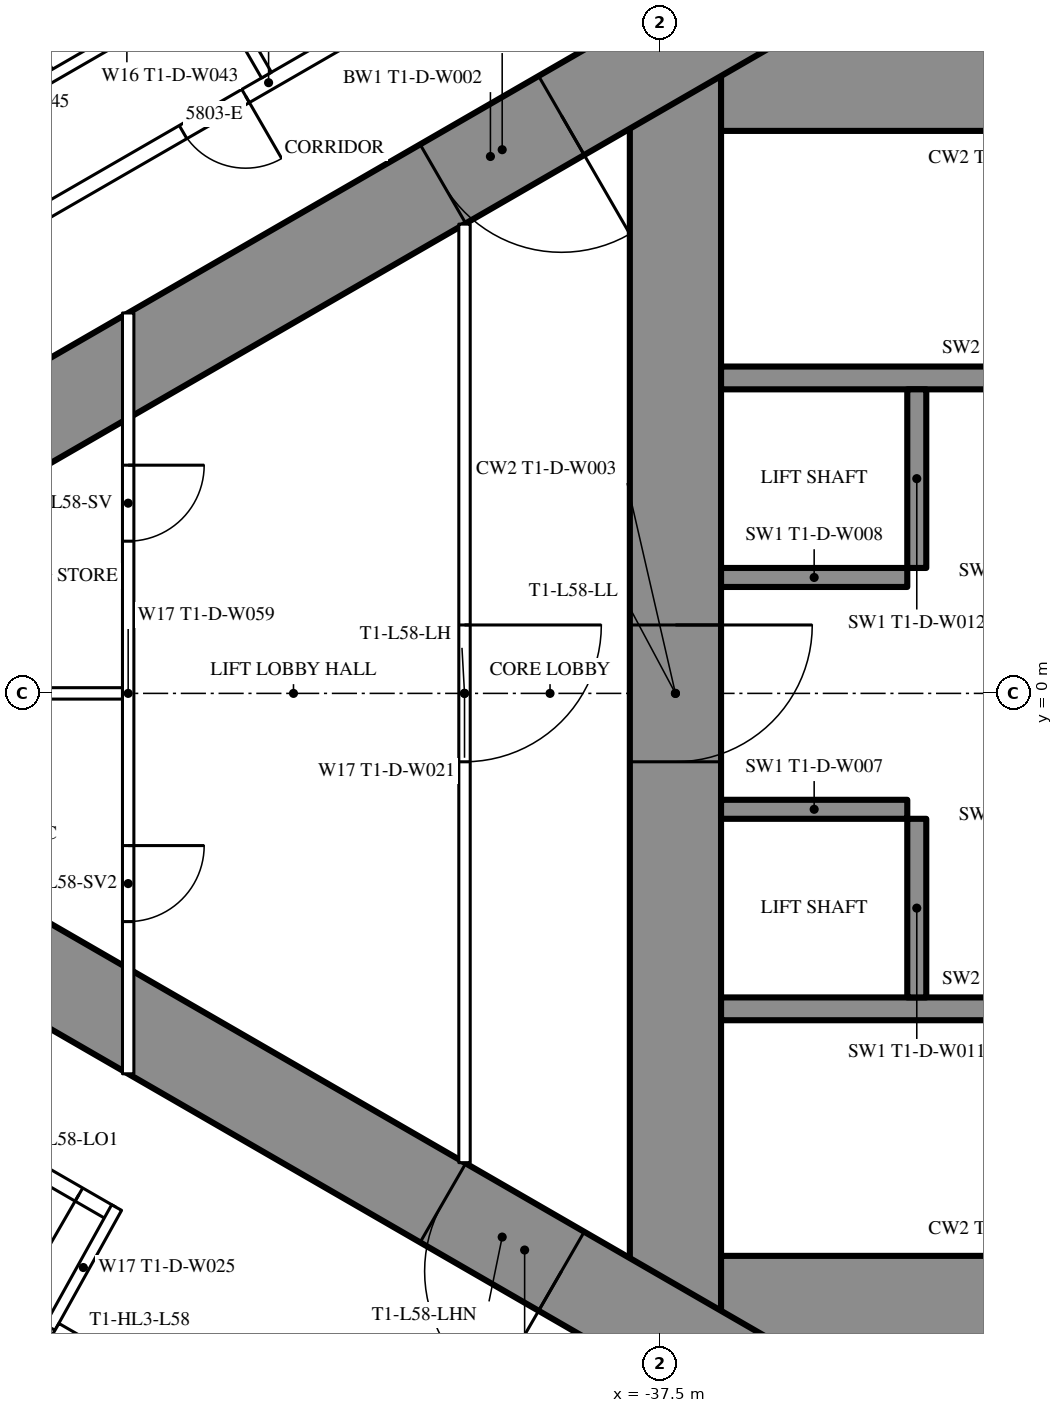
"""IFC4 building model, lengths in metres.
Left out: names, types, materials, properties, quantities, classifications, styles, units other than length and angle.
Written with IfcOpenShell. Run it as: python <this file> out.ifc"""

import sys

from ifc_helpers import new_model, si_unit, direction, frame, frame_2d, origin, place, context, subcontext, project, spatial, rectangle, extrude, element, fill, save


model = new_model("IFC4")
c1 = context("Model", 3, precision=1e-05, world=origin(), true_north=direction((0.0, 1.0)))
c2 = subcontext(c1, "Body", "Model", "MODEL_VIEW")
j1 = project(units=[si_unit("LENGTHUNIT", "METRE"), si_unit("PLANEANGLEUNIT", "RADIAN")], contexts=[c1])
p1 = place(None, origin())
s1 = spatial("IfcSite", under=j1, at=p1, CompositionType="ELEMENT")
p2 = place(p1, origin())
s2 = spatial("IfcBuilding", under=s1, at=p2, CompositionType="ELEMENT")
p3 = place(p2, frame((0.0, 0.0, 218.9)))
s3 = spatial("IfcBuildingStorey", under=s2, at=p3, CompositionType="ELEMENT", Elevation=218.9)
p4 = place(p3, frame((-37.3, 8.6, 0.0), z_axis=(0.0, 0.0, 1.0), x_axis=(0.0, -1.0, 0.0)))
e1 = element("IfcWall", 1, at=p4, inside=s3, PredefinedType="SHEAR", context=c2, shape_type="SweptSolid", body=[
    extrude(rectangle(XDim=17.2, YDim=1.2, at=frame_2d((8.6, 0.0))), origin(), (0.0, 0.0, 1.0), 3.6),
])
p5 = place(p4, frame((7.7, 0.0, 0.0)))
e2 = element("IfcOpeningElement", 2, at=p5, cuts=e1, PredefinedType="OPENING", context=c2, shape_type="SweptSolid", body=[
    extrude(rectangle(XDim=1.8, YDim=2.2, at=frame_2d((0.9, 1.1))), frame((0.0, 0.61, 0.0), z_axis=(0.0, -1.0, 0.0), x_axis=(1.0, 0.0, 0.0)), (0.0, 0.0, 1.0), 1.22),
])
p6 = place(p3, frame((-28.3, 8.0, 0.0), z_axis=(0.0, 0.0, 1.0), x_axis=(-1.0, 0.0, 0.0)))
e3 = element("IfcWall", 3, at=p6, inside=s3, PredefinedType="SHEAR", context=c2, shape_type="SweptSolid", body=[
    extrude(rectangle(XDim=8.4, YDim=1.2, at=frame_2d((4.2, 0.0))), origin(), (0.0, 0.0, 1.0), 3.6),
])
p7 = place(p6, frame((0.25, 0.0, 0.0)))
e4 = element("IfcOpeningElement", 4, at=p7, cuts=e3, PredefinedType="OPENING", context=c2, shape_type="SweptSolid", body=[
    extrude(rectangle(XDim=1.0, YDim=2.2, at=frame_2d((0.5, 1.1))), frame((0.0, 0.61, 0.0), z_axis=(0.0, -1.0, 0.0), x_axis=(1.0, 0.0, 0.0)), (0.0, 0.0, 1.0), 1.22),
])
p8 = place(p3, frame((-28.3, -8.0, 0.0), z_axis=(0.0, 0.0, 1.0), x_axis=(-1.0, 0.0, 0.0)))
e5 = element("IfcWall", 5, at=p8, inside=s3, PredefinedType="SHEAR", context=c2, shape_type="SweptSolid", body=[
    extrude(rectangle(XDim=8.4, YDim=1.2, at=frame_2d((4.2, 0.0))), origin(), (0.0, 0.0, 1.0), 3.6),
])
p9 = place(p8, frame((0.25, 0.0, 0.0)))
e6 = element("IfcOpeningElement", 6, at=p9, cuts=e5, PredefinedType="OPENING", context=c2, shape_type="SweptSolid", body=[
    extrude(rectangle(XDim=1.0, YDim=2.2, at=frame_2d((0.5, 1.1))), frame((0.0, 0.61, 0.0), z_axis=(0.0, -1.0, 0.0), x_axis=(1.0, 0.0, 0.0)), (0.0, 0.0, 1.0), 1.22),
])
for number, where, z_axis, x_axis in (
    (7, (-28.3, 4.15, 0.0), (0.0, 0.0, 1.0), (-1.0, 0.0, 0.0)),
    (8, (-28.3, -4.15, 0.0), (0.0, 0.0, 1.0), (-1.0, 0.0, 0.0)),
):
    element("IfcWall", number, at=place(p3, frame(where, z_axis=z_axis, x_axis=x_axis)), inside=s3, PredefinedType="SHEAR", context=c2, shape_type="SweptSolid", body=[
        extrude(rectangle(XDim=8.4, YDim=0.3, at=frame_2d((4.2, 0.0))), origin(), (0.0, 0.0, 1.0), 3.6),
    ])
p10 = place(p3, frame((-34.125, 4.0, 0.0), z_axis=(0.0, 0.0, 1.0), x_axis=(0.0, -1.0, 0.0)))
e9 = element("IfcWall", 9, at=p10, inside=s3, PredefinedType="SHEAR", context=c2, shape_type="SweptSolid", body=[
    extrude(rectangle(XDim=2.35, YDim=0.25, at=frame_2d((1.175, 0.0))), origin(), (0.0, 0.0, 1.0), 3.6),
])
p11 = place(p3, frame((-34.25, 1.525, 0.0), z_axis=(0.0, 0.0, 1.0), x_axis=(-1.0, 0.0, 0.0)))
e10 = element("IfcWall", 10, at=p11, inside=s3, PredefinedType="SHEAR", context=c2, shape_type="SweptSolid", body=[
    extrude(rectangle(XDim=2.45, YDim=0.25, at=frame_2d((1.225, 0.0))), origin(), (0.0, 0.0, 1.0), 3.6),
])
p12 = place(p3, frame((-34.125, -1.65, 0.0), z_axis=(0.0, 0.0, 1.0), x_axis=(0.0, -1.0, 0.0)))
e11 = element("IfcWall", 11, at=p12, inside=s3, PredefinedType="SHEAR", context=c2, shape_type="SweptSolid", body=[
    extrude(rectangle(XDim=2.35, YDim=0.25, at=frame_2d((1.175, 0.0))), origin(), (0.0, 0.0, 1.0), 3.6),
])
p13 = place(p3, frame((-34.25, -1.525, 0.0), z_axis=(0.0, 0.0, 1.0), x_axis=(-1.0, 0.0, 0.0)))
e12 = element("IfcWall", 12, at=p13, inside=s3, PredefinedType="SHEAR", context=c2, shape_type="SweptSolid", body=[
    extrude(rectangle(XDim=2.45, YDim=0.25, at=frame_2d((1.225, 0.0))), origin(), (0.0, 0.0, 1.0), 3.6),
])
p14 = place(p3, frame((-27.2, 14.3, 0.0), z_axis=(0.0, 0.0, 1.0), x_axis=(-0.866026593062, -0.499997940104, 0.0)))
e13 = element("IfcWall", 13, at=p14, inside=s3, PredefinedType="SHEAR", context=c2, shape_type="SweptSolid", body=[
    extrude(rectangle(XDim=28.946, YDim=1.2, at=frame_2d((14.473, 0.0))), origin(), (0.0, 0.0, 1.0), 3.6),
])
p15 = place(p14, frame((4.6, 0.0, 0.0)))
e14 = element("IfcOpeningElement", 14, at=p15, cuts=e13, PredefinedType="OPENING", context=c2, shape_type="SweptSolid", body=[
    extrude(rectangle(XDim=1.0, YDim=2.2, at=frame_2d((0.5, 1.1))), frame((0.0, 0.61, 0.0), z_axis=(0.0, -1.0, 0.0), x_axis=(1.0, 0.0, 0.0)), (0.0, 0.0, 1.0), 1.22),
])
p16 = place(p14, frame((13.395, 0.0, 0.0)))
e15 = element("IfcOpeningElement", 15, at=p16, cuts=e13, PredefinedType="OPENING", context=c2, shape_type="SweptSolid", body=[
    extrude(rectangle(XDim=1.8, YDim=2.2, at=frame_2d((0.9, 1.1))), frame((0.0, 0.61, 0.0), z_axis=(0.0, -1.0, 0.0), x_axis=(1.0, 0.0, 0.0)), (0.0, 0.0, 1.0), 1.22),
])
p17 = place(p3, frame((-27.2, -14.3, 0.0), z_axis=(0.0, 0.0, 1.0), x_axis=(-0.866024021859, 0.500002393557, 0.0)))
e16 = element("IfcWall", 16, at=p17, inside=s3, PredefinedType="SHEAR", context=c2, shape_type="SweptSolid", body=[
    extrude(rectangle(XDim=27.907, YDim=1.2, at=frame_2d((13.954, 0.0))), origin(), (0.0, 0.0, 1.0), 3.6),
])
p18 = place(p17, frame((4.6, 0.0, 0.0)))
e17 = element("IfcOpeningElement", 17, at=p18, cuts=e16, PredefinedType="OPENING", context=c2, shape_type="SweptSolid", body=[
    extrude(rectangle(XDim=1.0, YDim=2.2, at=frame_2d((0.5, 1.1))), frame((0.0, 0.61, 0.0), z_axis=(0.0, -1.0, 0.0), x_axis=(1.0, 0.0, 0.0)), (0.0, 0.0, 1.0), 1.22),
])
p19 = place(p17, frame((13.395, 0.0, 0.0)))
e18 = element("IfcOpeningElement", 18, at=p19, cuts=e16, PredefinedType="OPENING", context=c2, shape_type="SweptSolid", body=[
    extrude(rectangle(XDim=1.8, YDim=2.2, at=frame_2d((0.9, 1.1))), frame((0.0, 0.61, 0.0), z_axis=(0.0, -1.0, 0.0), x_axis=(1.0, 0.0, 0.0)), (0.0, 0.0, 1.0), 1.22),
])
p20 = place(p3, frame((-28.737, 16.068, 0.0), z_axis=(0.0, 0.0, 1.0), x_axis=(-0.866026057212, -0.499998868229, 0.0)))
e19 = element("IfcWall", 19, at=p20, inside=s3, PredefinedType="PARTITIONING", context=c2, shape_type="SweptSolid", body=[
    extrude(rectangle(XDim=32.137, YDim=0.2, at=frame_2d((16.068, 0.0))), origin(), (0.0, 0.0, 1.0), 3.35),
])
p21 = place(p20, frame((1.08, 0.0, 0.0)))
e20 = element("IfcOpeningElement", 20, at=p21, cuts=e19, PredefinedType="OPENING", context=c2, shape_type="SweptSolid", body=[
    extrude(rectangle(XDim=1.8, YDim=2.03, at=frame_2d((0.9, 1.015))), frame((0.0, 0.11, 0.0), z_axis=(0.0, -1.0, 0.0), x_axis=(1.0, 0.0, 0.0)), (0.0, 0.0, 1.0), 0.22),
])
p22 = place(p20, frame((6.86, 0.0, 0.0)))
e21 = element("IfcOpeningElement", 21, at=p22, cuts=e19, PredefinedType="OPENING", context=c2, shape_type="SweptSolid", body=[
    extrude(rectangle(XDim=1.0, YDim=2.2, at=frame_2d((0.5, 1.1))), frame((0.0, 0.11, 0.0), z_axis=(0.0, -1.0, 0.0), x_axis=(1.0, 0.0, 0.0)), (0.0, 0.0, 1.0), 0.22),
])
p23 = place(p20, frame((16.418, 0.0, 0.0)))
e22 = element("IfcOpeningElement", 22, at=p23, cuts=e19, PredefinedType="OPENING", context=c2, shape_type="SweptSolid", body=[
    extrude(rectangle(XDim=0.95, YDim=2.2, at=frame_2d((0.475, 1.1))), frame((0.0, 0.11, 0.0), z_axis=(0.0, -1.0, 0.0), x_axis=(1.0, 0.0, 0.0)), (0.0, 0.0, 1.0), 0.22),
])
p24 = place(p20, frame((20.567, 0.0, 0.0)))
e23 = element("IfcOpeningElement", 23, at=p24, cuts=e19, PredefinedType="OPENING", context=c2, shape_type="SweptSolid", body=[
    extrude(rectangle(XDim=0.95, YDim=2.2, at=frame_2d((0.475, 1.1))), frame((0.0, 0.11, 0.0), z_axis=(0.0, -1.0, 0.0), x_axis=(1.0, 0.0, 0.0)), (0.0, 0.0, 1.0), 0.22),
])
p25 = place(p20, frame((27.065, 0.0, 0.0)))
e24 = element("IfcOpeningElement", 24, at=p25, cuts=e19, PredefinedType="OPENING", context=c2, shape_type="SweptSolid", body=[
    extrude(rectangle(XDim=0.95, YDim=2.2, at=frame_2d((0.475, 1.1))), frame((0.0, 0.11, 0.0), z_axis=(0.0, -1.0, 0.0), x_axis=(1.0, 0.0, 0.0)), (0.0, 0.0, 1.0), 0.22),
])
p26 = place(p3, frame((-42.68, 8.134, 0.0), z_axis=(0.0, 0.0, 1.0), x_axis=(-0.499984479505, 0.866034364361, 0.0)))
e25 = element("IfcWall", 25, at=p26, inside=s3, PredefinedType="PARTITIONING", context=c2, shape_type="SweptSolid", body=[
    extrude(rectangle(XDim=5.995, YDim=0.15, at=frame_2d((2.998, 0.0))), origin(), (0.0, 0.0, 1.0), 2.45),
])
p27 = place(p3, frame((-44.715, -6.844, 0.0), z_axis=(0.0, 0.0, 1.0), x_axis=(-0.866025261224, 0.500000246922, 0.0)))
e26 = element("IfcWall", 26, at=p27, inside=s3, PredefinedType="PARTITIONING", context=c2, shape_type="SweptSolid", body=[
    extrude(rectangle(XDim=13.567, YDim=0.2, at=frame_2d((6.783, 0.0))), origin(), (0.0, 0.0, 1.0), 3.35),
])
p28 = place(p27, frame((9.667, 0.0, 0.0)))
e27 = element("IfcOpeningElement", 27, at=p28, cuts=e26, PredefinedType="OPENING", context=c2, shape_type="SweptSolid", body=[
    extrude(rectangle(XDim=0.95, YDim=2.2, at=frame_2d((0.475, 1.1))), frame((0.0, 0.11, 0.0), z_axis=(0.0, -1.0, 0.0), x_axis=(1.0, 0.0, 0.0)), (0.0, 0.0, 1.0), 0.22),
])
p29 = place(p27, frame((2.117, 0.0, 0.0)))
e28 = element("IfcOpeningElement", 28, at=p29, cuts=e26, PredefinedType="OPENING", context=c2, shape_type="SweptSolid", body=[
    extrude(rectangle(XDim=0.95, YDim=2.2, at=frame_2d((0.475, 1.1))), frame((0.0, 0.11, 0.0), z_axis=(0.0, -1.0, 0.0), x_axis=(1.0, 0.0, 0.0)), (0.0, 0.0, 1.0), 0.22),
])
p30 = place(p27, frame((0.5, 0.0, 0.0)))
e29 = element("IfcOpeningElement", 29, at=p30, cuts=e26, PredefinedType="OPENING", context=c2, shape_type="SweptSolid", body=[
    extrude(rectangle(XDim=0.967, YDim=2.2, at=frame_2d((0.483, 1.1))), frame((0.0, 0.11, 0.0), z_axis=(0.0, -1.0, 0.0), x_axis=(1.0, 0.0, 0.0)), (0.0, 0.0, 1.0), 0.22),
])
p31 = place(p3, frame((-44.652, -6.764, 0.0), z_axis=(0.0, 0.0, 1.0), x_axis=(-0.485424724123, -0.874278466629, 0.0)))
e30 = element("IfcWall", 30, at=p31, inside=s3, PredefinedType="PARTITIONING", context=c2, shape_type="SweptSolid", body=[
    extrude(rectangle(XDim=1.805, YDim=0.15, at=frame_2d((0.903, 0.0))), origin(), (0.0, 0.0, 1.0), 3.35),
])
p32 = place(p3, frame((-45.524, 8.109, 0.0), z_axis=(0.0, 0.0, 1.0), x_axis=(-0.49997716683, 0.86603858612, 0.0)))
e31 = element("IfcWall", 31, at=p32, inside=s3, PredefinedType="PARTITIONING", context=c2, shape_type="SweptSolid", body=[
    extrude(rectangle(XDim=2.6, YDim=0.15, at=frame_2d((1.3, 0.0))), origin(), (0.0, 0.0, 1.0), 3.35),
])
p33 = place(p32, frame((0.9, 0.0, 0.0)))
e32 = element("IfcOpeningElement", 32, at=p33, cuts=e31, PredefinedType="OPENING", context=c2, shape_type="SweptSolid", body=[
    extrude(rectangle(XDim=0.8, YDim=2.2, at=frame_2d((0.4, 1.1))), frame((0.0, 0.085, 0.0), z_axis=(0.0, -1.0, 0.0), x_axis=(1.0, 0.0, 0.0)), (0.0, 0.0, 1.0), 0.17),
])
p34 = place(p3, frame((-43.445, 9.309, 0.0), z_axis=(0.0, 0.0, 1.0), x_axis=(-0.866031185235, -0.4999899861, 0.0)))
e33 = element("IfcWall", 33, at=p34, inside=s3, PredefinedType="PARTITIONING", context=c2, shape_type="SweptSolid", body=[
    extrude(rectangle(XDim=2.475, YDim=0.15, at=frame_2d((1.238, 0.0))), origin(), (0.0, 0.0, 1.0), 3.35),
])
p35 = place(p3, frame((-40.075, 6.174, 0.0), z_axis=(0.0, 0.0, 1.0), x_axis=(0.0, -1.0, 0.0)))
e34 = element("IfcWall", 34, at=p35, inside=s3, PredefinedType="PARTITIONING", context=c2, shape_type="SweptSolid", body=[
    extrude(rectangle(XDim=12.348, YDim=0.15, at=frame_2d((6.174, 0.0))), origin(), (0.0, 0.0, 1.0), 3.35),
])
p36 = place(p35, frame((5.274, 0.0, 0.0)))
e35 = element("IfcOpeningElement", 35, at=p36, cuts=e34, PredefinedType="OPENING", context=c2, shape_type="SweptSolid", body=[
    extrude(rectangle(XDim=1.8, YDim=2.2, at=frame_2d((0.9, 1.1))), frame((0.0, 0.085, 0.0), z_axis=(0.0, -1.0, 0.0), x_axis=(1.0, 0.0, 0.0)), (0.0, 0.0, 1.0), 0.17),
])
p37 = place(p3, frame((-44.5, 5.005, 0.0), z_axis=(0.0, 0.0, 1.0), x_axis=(0.0, -1.0, 0.0)))
e36 = element("IfcWall", 36, at=p37, inside=s3, PredefinedType="PARTITIONING", context=c2, shape_type="SweptSolid", body=[
    extrude(rectangle(XDim=10.009, YDim=0.15, at=frame_2d((5.005, 0.0))), origin(), (0.0, 0.0, 1.0), 2.5),
])
p38 = place(p37, frame((2.002, 0.0, 0.0)))
e37 = element("IfcOpeningElement", 37, at=p38, cuts=e36, PredefinedType="OPENING", context=c2, shape_type="SweptSolid", body=[
    extrude(rectangle(XDim=1.0, YDim=2.2, at=frame_2d((0.5, 1.1))), frame((0.0, 0.085, 0.0), z_axis=(0.0, -1.0, 0.0), x_axis=(1.0, 0.0, 0.0)), (0.0, 0.0, 1.0), 0.17),
])
p39 = place(p37, frame((7.007, 0.0, 0.0)))
e38 = element("IfcOpeningElement", 38, at=p39, cuts=e36, PredefinedType="OPENING", context=c2, shape_type="SweptSolid", body=[
    extrude(rectangle(XDim=1.0, YDim=2.2, at=frame_2d((0.5, 1.1))), frame((0.0, 0.085, 0.0), z_axis=(0.0, -1.0, 0.0), x_axis=(1.0, 0.0, 0.0)), (0.0, 0.0, 1.0), 0.17),
])
p40 = place(p3, frame((-44.575, 0.0, 0.0), z_axis=(0.0, 0.0, 1.0), x_axis=(-1.0, 0.0, 0.0)))
e39 = element("IfcWall", 39, at=p40, inside=s3, PredefinedType="PARTITIONING", context=c2, shape_type="SweptSolid", body=[
    extrude(rectangle(XDim=8.593, YDim=0.15, at=frame_2d((4.297, 0.0))), origin(), (0.0, 0.0, 1.0), 2.45),
])
p41 = place(p3, frame((-39.758, -11.697, 0.0), z_axis=(0.0, 0.0, 1.0), x_axis=(-0.866024194504, 0.500002094529, 0.0)))
e40 = element("IfcWall", 40, at=p41, inside=s3, PredefinedType="PARTITIONING", context=c2, shape_type="SweptSolid", body=[
    extrude(rectangle(XDim=6.6, YDim=0.25, at=frame_2d((3.3, 0.0))), origin(), (0.0, 0.0, 1.0), 3.35),
])
p42 = place(p41, frame((0.75, 0.0, 0.0)))
e41 = element("IfcOpeningElement", 41, at=p42, cuts=e40, PredefinedType="OPENING", context=c2, shape_type="SweptSolid", body=[
    extrude(rectangle(XDim=1.1, YDim=2.2, at=frame_2d((0.55, 1.1))), frame((0.0, 0.135, 0.0), z_axis=(0.0, -1.0, 0.0), x_axis=(1.0, 0.0, 0.0)), (0.0, 0.0, 1.0), 0.27),
])
p43 = place(p41, frame((2.75, 0.0, 0.0)))
e42 = element("IfcOpeningElement", 42, at=p43, cuts=e40, PredefinedType="OPENING", context=c2, shape_type="SweptSolid", body=[
    extrude(rectangle(XDim=1.1, YDim=2.2, at=frame_2d((0.55, 1.1))), frame((0.0, 0.135, 0.0), z_axis=(0.0, -1.0, 0.0), x_axis=(1.0, 0.0, 0.0)), (0.0, 0.0, 1.0), 0.27),
])
p44 = place(p41, frame((4.75, 0.0, 0.0)))
e43 = element("IfcOpeningElement", 43, at=p44, cuts=e40, PredefinedType="OPENING", context=c2, shape_type="SweptSolid", body=[
    extrude(rectangle(XDim=1.1, YDim=2.2, at=frame_2d((0.55, 1.1))), frame((0.0, 0.135, 0.0), z_axis=(0.0, -1.0, 0.0), x_axis=(1.0, 0.0, 0.0)), (0.0, 0.0, 1.0), 0.27),
])
p45 = place(p23, origin())
e44 = element("IfcDoor", 44, at=p45, inside=s3, OperationType="SINGLE_SWING_LEFT", PredefinedType="DOOR", context=c2, shape_type="SweptSolid", body=[
    extrude(rectangle(XDim=0.95, YDim=2.2, at=frame_2d((0.475, 1.1))), frame((0.0, 0.025, 0.0), z_axis=(0.0, -1.0, 0.0), x_axis=(1.0, 0.0, 0.0)), (0.0, 0.0, 1.0), 0.05),
])
fill(e22, e44)
p46 = place(p30, origin())
e45 = element("IfcDoor", 45, at=p46, inside=s3, OperationType="SINGLE_SWING_LEFT", PredefinedType="DOOR", context=c2, shape_type="SweptSolid", body=[
    extrude(rectangle(XDim=0.967, YDim=2.2, at=frame_2d((0.483, 1.1))), frame((0.0, 0.025, 0.0), z_axis=(0.0, -1.0, 0.0), x_axis=(1.0, 0.0, 0.0)), (0.0, 0.0, 1.0), 0.05),
])
fill(e29, e45)
p47 = place(p36, origin())
e46 = element("IfcDoor", 46, at=p47, inside=s3, OperationType="DOUBLE_DOOR_SINGLE_SWING", PredefinedType="DOOR", context=c2, shape_type="SweptSolid", body=[
    extrude(rectangle(XDim=1.8, YDim=2.2, at=frame_2d((0.9, 1.1))), frame((0.0, 0.025, 0.0), z_axis=(0.0, -1.0, 0.0), x_axis=(1.0, 0.0, 0.0)), (0.0, 0.0, 1.0), 0.05),
])
fill(e35, e46)
p48 = place(p38, origin())
e47 = element("IfcDoor", 47, at=p48, inside=s3, OperationType="SINGLE_SWING_LEFT", PredefinedType="DOOR", context=c2, shape_type="SweptSolid", body=[
    extrude(rectangle(XDim=1.0, YDim=2.2, at=frame_2d((0.5, 1.1))), frame((0.0, 0.025, 0.0), z_axis=(0.0, -1.0, 0.0), x_axis=(1.0, 0.0, 0.0)), (0.0, 0.0, 1.0), 0.05),
])
fill(e37, e47)
p49 = place(p39, origin())
e48 = element("IfcDoor", 48, at=p49, inside=s3, OperationType="SINGLE_SWING_LEFT", PredefinedType="DOOR", context=c2, shape_type="SweptSolid", body=[
    extrude(rectangle(XDim=1.0, YDim=2.2, at=frame_2d((0.5, 1.1))), frame((0.0, 0.025, 0.0), z_axis=(0.0, -1.0, 0.0), x_axis=(1.0, 0.0, 0.0)), (0.0, 0.0, 1.0), 0.05),
])
fill(e38, e48)
p50 = place(p16, origin())
e49 = element("IfcDoor", 49, at=p50, inside=s3, OperationType="DOUBLE_DOOR_SINGLE_SWING", PredefinedType="DOOR", context=c2, shape_type="SweptSolid", body=[
    extrude(rectangle(XDim=1.8, YDim=2.2, at=frame_2d((0.9, 1.1))), frame((0.0, 0.025, 0.0), z_axis=(0.0, -1.0, 0.0), x_axis=(1.0, 0.0, 0.0)), (0.0, 0.0, 1.0), 0.05),
])
fill(e15, e49)
p51 = place(p19, origin())
e50 = element("IfcDoor", 50, at=p51, inside=s3, OperationType="DOUBLE_DOOR_SINGLE_SWING", PredefinedType="DOOR", context=c2, shape_type="SweptSolid", body=[
    extrude(rectangle(XDim=1.8, YDim=2.2, at=frame_2d((0.9, 1.1))), frame((0.0, 0.025, 0.0), z_axis=(0.0, -1.0, 0.0), x_axis=(1.0, 0.0, 0.0)), (0.0, 0.0, 1.0), 0.05),
])
fill(e18, e50)
p52 = place(p5, origin())
e51 = element("IfcDoor", 51, at=p52, inside=s3, OperationType="DOUBLE_DOOR_SINGLE_SWING", PredefinedType="DOOR", context=c2, shape_type="SweptSolid", body=[
    extrude(rectangle(XDim=1.8, YDim=2.2, at=frame_2d((0.9, 1.1))), frame((0.0, 0.025, 0.0), z_axis=(0.0, -1.0, 0.0), x_axis=(1.0, 0.0, 0.0)), (0.0, 0.0, 1.0), 0.05),
])
fill(e2, e51)
save(model, sys.argv[1])
